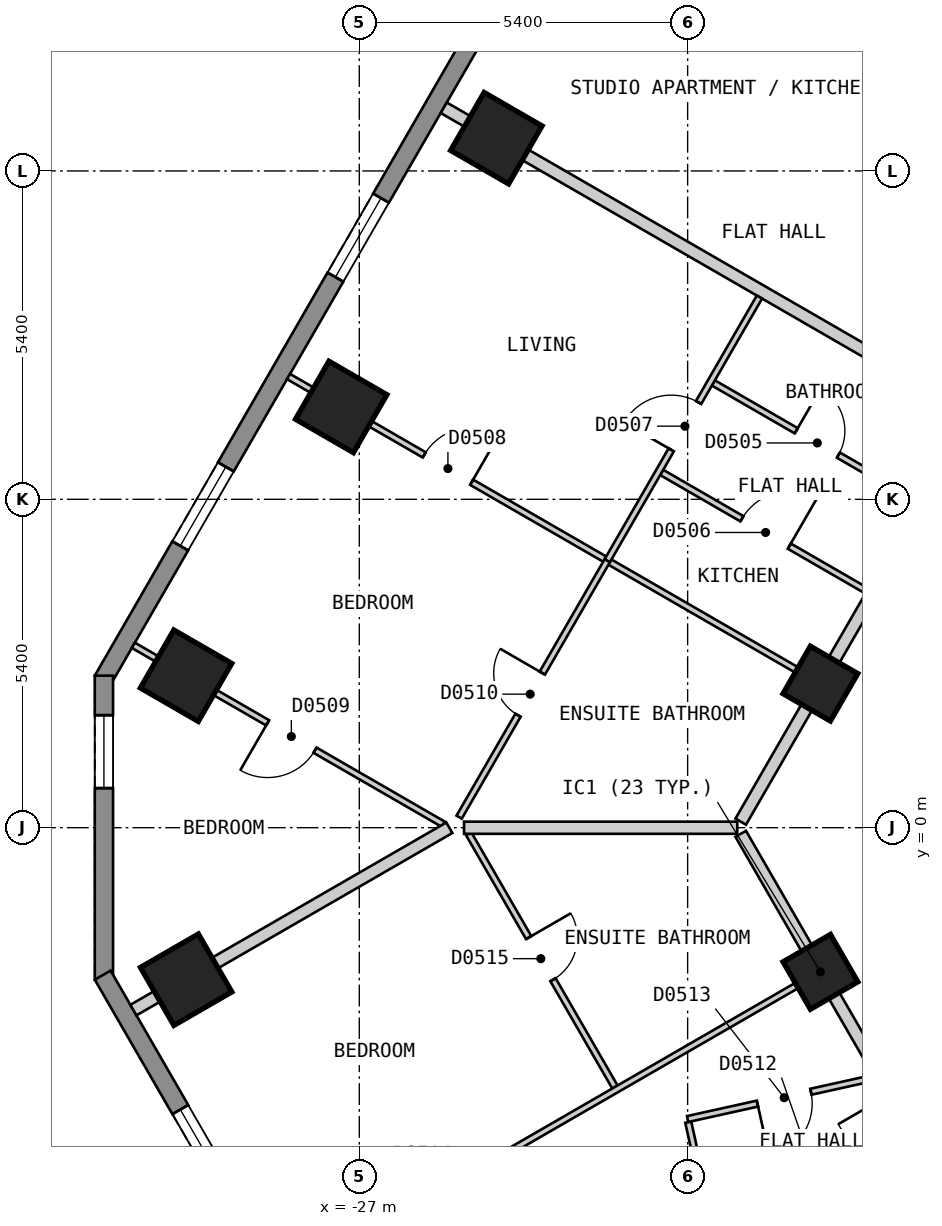
"""IFC4 building model, lengths in metres.
Left out: names, types, materials, properties, quantities, classifications, styles, units other than length and angle.
Written with IfcOpenShell. Run it as: python <this file> out.ifc"""

import sys

from ifc_helpers import new_model, si_unit, direction, frame, frame_2d, origin, origin_2d, place, context, subcontext, project, spatial, polyline, rectangle, outline, extrude, element, fill, save


model = new_model("IFC4")
c1 = context("Model", 3, precision=1e-05, world=origin(), true_north=direction((0.0, 1.0)))
c2 = subcontext(c1, "Body", "Model", "MODEL_VIEW")
j1 = project(units=[si_unit("LENGTHUNIT", "METRE"), si_unit("PLANEANGLEUNIT", "RADIAN")], contexts=[c1])
p1 = place(None, origin())
s1 = spatial("IfcSite", under=j1, at=p1, CompositionType="ELEMENT")
p2 = place(p1, origin())
s2 = spatial("IfcBuilding", under=s1, at=p2, CompositionType="ELEMENT")
p3 = place(p2, frame((0.0, 0.0, 56.4)))
s3 = spatial("IfcBuildingStorey", under=s2, at=p3, CompositionType="ELEMENT", Elevation=56.4)
for number, where, z_axis, x_axis in (
    (1, (-24.746, 11.339, 0.0), (0.0, 0.0, 1.0), (-0.5, -0.866, 0.0)),
    (2, (-27.298, 6.919, 0.0), (0.0, 0.0, 1.0), (-0.5, -0.866, 0.0)),
    (3, (-29.849, 2.499, 0.0), (0.0, 0.0, 1.0), (-0.5, -0.866, 0.0)),
    (4, (-29.848, -2.5, 0.0), (0.0, 0.0, 1.0), (0.5, -0.866, 0.0)),
):
    element("IfcColumn", number, at=place(p3, frame(where, z_axis=z_axis, x_axis=x_axis)), inside=s3, PredefinedType="COLUMN", context=c2, shape_type="SweptSolid", body=[
        extrude(rectangle(XDim=1.1, YDim=1.1, at=origin_2d()), origin(), (0.0, 0.0, 1.0), 3.0),
    ])
for number, where, z_axis, x_axis in (
    (5, (-19.416, -2.371, 0.0), (0.0, 0.0, 1.0), (0.5, -0.866, 0.0)),
    (6, (-19.417, 2.369, 0.0), (0.0, 0.0, 1.0), (-0.5, -0.866, 0.0)),
):
    element("IfcColumn", number, at=place(p3, frame(where, z_axis=z_axis, x_axis=x_axis)), inside=s3, PredefinedType="COLUMN", context=c2, shape_type="SweptSolid", body=[
        extrude(rectangle(XDim=0.9, YDim=0.9, at=origin_2d()), origin(), (0.0, 0.0, 1.0), 3.0),
    ])
p4 = place(p3, frame((-17.71, 25.825, 0.0), z_axis=(0.0, 0.0, 1.0), x_axis=(-0.500001938803, -0.866024284413, 0.0)))
e7 = element("IfcWall", 7, at=p4, inside=s3, PredefinedType="SOLIDWALL", context=c2, shape_type="SweptSolid", body=[
    extrude(outline(polyline([(0.0, -0.15), (27.02, -0.15), (26.94, 0.15), (0.08, 0.15), (0.0, -0.15)])), origin(), (0.0, 0.0, 1.0), 2.7),
])
p5 = place(p4, frame((2.553, 0.0, 0.15)))
e8 = element("IfcOpeningElement", 8, at=p5, cuts=e7, PredefinedType="OPENING", context=c2, shape_type="SweptSolid", body=[
    extrude(rectangle(XDim=1.5, YDim=2.1, at=frame_2d((0.75, 1.05))), frame((0.0, 0.16, 0.0), z_axis=(0.0, -1.0, 0.0), x_axis=(1.0, 0.0, 0.0)), (0.0, 0.0, 1.0), 0.32),
])
p6 = place(p4, frame((7.658, 0.0, 0.15)))
e9 = element("IfcOpeningElement", 9, at=p6, cuts=e7, PredefinedType="OPENING", context=c2, shape_type="SweptSolid", body=[
    extrude(rectangle(XDim=1.5, YDim=2.1, at=frame_2d((0.75, 1.05))), frame((0.0, 0.16, 0.0), z_axis=(0.0, -1.0, 0.0), x_axis=(1.0, 0.0, 0.0)), (0.0, 0.0, 1.0), 0.32),
])
p7 = place(p4, frame((12.761, 0.0, 0.15)))
e10 = element("IfcOpeningElement", 10, at=p7, cuts=e7, PredefinedType="OPENING", context=c2, shape_type="SweptSolid", body=[
    extrude(rectangle(XDim=1.5, YDim=2.1, at=frame_2d((0.75, 1.05))), frame((0.0, 0.16, 0.0), z_axis=(0.0, -1.0, 0.0), x_axis=(1.0, 0.0, 0.0)), (0.0, 0.0, 1.0), 0.32),
])
p8 = place(p4, frame((17.865, 0.0, 0.15)))
e11 = element("IfcOpeningElement", 11, at=p8, cuts=e7, PredefinedType="OPENING", context=c2, shape_type="SweptSolid", body=[
    extrude(rectangle(XDim=1.5, YDim=2.1, at=frame_2d((0.75, 1.05))), frame((0.0, 0.16, 0.0), z_axis=(0.0, -1.0, 0.0), x_axis=(1.0, 0.0, 0.0)), (0.0, 0.0, 1.0), 0.32),
])
p9 = place(p4, frame((22.969, 0.0, 0.15)))
e12 = element("IfcOpeningElement", 12, at=p9, cuts=e7, PredefinedType="OPENING", context=c2, shape_type="SweptSolid", body=[
    extrude(rectangle(XDim=1.5, YDim=2.1, at=frame_2d((0.75, 1.05))), frame((0.0, 0.16, 0.0), z_axis=(0.0, -1.0, 0.0), x_axis=(1.0, 0.0, 0.0)), (0.0, 0.0, 1.0), 0.32),
])
p10 = place(p3, frame((-31.2, 2.5, 0.0), z_axis=(0.0, 0.0, 1.0), x_axis=(0.0, -1.0, 0.0)))
e13 = element("IfcWall", 13, at=p10, inside=s3, PredefinedType="SOLIDWALL", context=c2, shape_type="SweptSolid", body=[
    extrude(outline(polyline([(0.0, -0.15), (5.0, -0.15), (4.92, 0.15), (0.08, 0.15), (0.0, -0.15)])), origin(), (0.0, 0.0, 1.0), 2.7),
])
p11 = place(p10, frame((0.65, 0.0, 0.15)))
e14 = element("IfcOpeningElement", 14, at=p11, cuts=e13, PredefinedType="OPENING", context=c2, shape_type="SweptSolid", body=[
    extrude(rectangle(XDim=1.2, YDim=2.1, at=frame_2d((0.6, 1.05))), frame((0.0, 0.16, 0.0), z_axis=(0.0, -1.0, 0.0), x_axis=(1.0, 0.0, 0.0)), (0.0, 0.0, 1.0), 0.32),
])
p12 = place(p3, frame((-31.22, -2.425, 0.0), z_axis=(0.0, 0.0, 1.0), x_axis=(0.500001938803, -0.866024284413, 0.0)))
e15 = element("IfcWall", 15, at=p12, inside=s3, PredefinedType="SOLIDWALL", context=c2, shape_type="SweptSolid", body=[
    extrude(outline(polyline([(0.0, -0.15), (27.02, -0.15), (26.94, 0.15), (0.08, 0.15), (0.0, -0.15)])), origin(), (0.0, 0.0, 1.0), 2.7),
])
p13 = place(p12, frame((2.553, 0.0, 0.15)))
e16 = element("IfcOpeningElement", 16, at=p13, cuts=e15, PredefinedType="OPENING", context=c2, shape_type="SweptSolid", body=[
    extrude(rectangle(XDim=1.5, YDim=2.1, at=frame_2d((0.75, 1.05))), frame((0.0, 0.16, 0.0), z_axis=(0.0, -1.0, 0.0), x_axis=(1.0, 0.0, 0.0)), (0.0, 0.0, 1.0), 0.32),
])
p14 = place(p12, frame((7.657, 0.0, 0.15)))
e17 = element("IfcOpeningElement", 17, at=p14, cuts=e15, PredefinedType="OPENING", context=c2, shape_type="SweptSolid", body=[
    extrude(rectangle(XDim=1.5, YDim=2.1, at=frame_2d((0.75, 1.05))), frame((0.0, 0.16, 0.0), z_axis=(0.0, -1.0, 0.0), x_axis=(1.0, 0.0, 0.0)), (0.0, 0.0, 1.0), 0.32),
])
p15 = place(p12, frame((12.761, 0.0, 0.15)))
e18 = element("IfcOpeningElement", 18, at=p15, cuts=e15, PredefinedType="OPENING", context=c2, shape_type="SweptSolid", body=[
    extrude(rectangle(XDim=1.5, YDim=2.1, at=frame_2d((0.75, 1.05))), frame((0.0, 0.16, 0.0), z_axis=(0.0, -1.0, 0.0), x_axis=(1.0, 0.0, 0.0)), (0.0, 0.0, 1.0), 0.32),
])
p16 = place(p12, frame((17.865, 0.0, 0.15)))
e19 = element("IfcOpeningElement", 19, at=p16, cuts=e15, PredefinedType="OPENING", context=c2, shape_type="SweptSolid", body=[
    extrude(rectangle(XDim=1.5, YDim=2.1, at=frame_2d((0.75, 1.05))), frame((0.0, 0.16, 0.0), z_axis=(0.0, -1.0, 0.0), x_axis=(1.0, 0.0, 0.0)), (0.0, 0.0, 1.0), 0.32),
])
p17 = place(p12, frame((22.969, 0.0, 0.15)))
e20 = element("IfcOpeningElement", 20, at=p17, cuts=e15, PredefinedType="OPENING", context=c2, shape_type="SweptSolid", body=[
    extrude(rectangle(XDim=1.5, YDim=2.1, at=frame_2d((0.75, 1.05))), frame((0.0, 0.16, 0.0), z_axis=(0.0, -1.0, 0.0), x_axis=(1.0, 0.0, 0.0)), (0.0, 0.0, 1.0), 0.32),
])
p18 = place(p3, frame((-20.727, -0.101, 0.0), z_axis=(0.0, 0.0, 1.0), x_axis=(0.500065652488, -0.865987495984, 0.0)))
e21 = element("IfcWall", 21, at=p18, inside=s3, PredefinedType="PARTITIONING", context=c2, shape_type="SweptSolid", body=[
    extrude(rectangle(XDim=7.389, YDim=0.2, at=frame_2d((3.695, 0.0))), origin(), (0.0, 0.0, 1.0), 2.7),
])
p19 = place(p18, frame((4.937, 0.0, 0.0)))
e22 = element("IfcOpeningElement", 22, at=p19, cuts=e21, PredefinedType="OPENING", context=c2, shape_type="SweptSolid", body=[
    extrude(rectangle(XDim=1.0, YDim=2.1, at=frame_2d((0.5, 1.05))), frame((0.0, 0.11, 0.0), z_axis=(0.0, -1.0, 0.0), x_axis=(1.0, 0.0, 0.0)), (0.0, 0.0, 1.0), 0.22),
])
p20 = place(p3, frame((-20.727, 0.099, 0.0), z_axis=(0.0, 0.0, 1.0), x_axis=(0.499993204491, 0.866029327138, 0.0)))
e23 = element("IfcWall", 23, at=p20, inside=s3, PredefinedType="PARTITIONING", context=c2, shape_type="SweptSolid", body=[
    extrude(rectangle(XDim=20.554, YDim=0.2, at=frame_2d((10.277, 0.0))), origin(), (0.0, 0.0, 1.0), 2.7),
])
p21 = place(p20, frame((9.776, 0.0, 0.0)))
e24 = element("IfcOpeningElement", 24, at=p21, cuts=e23, PredefinedType="OPENING", context=c2, shape_type="SweptSolid", body=[
    extrude(rectangle(XDim=1.0, YDim=2.1, at=frame_2d((0.5, 1.05))), frame((0.0, 0.11, 0.0), z_axis=(0.0, -1.0, 0.0), x_axis=(1.0, 0.0, 0.0)), (0.0, 0.0, 1.0), 0.22),
])
p22 = place(p20, frame((4.673, 0.0, 0.0)))
e25 = element("IfcOpeningElement", 25, at=p22, cuts=e23, PredefinedType="OPENING", context=c2, shape_type="SweptSolid", body=[
    extrude(rectangle(XDim=1.0, YDim=2.1, at=frame_2d((0.5, 1.05))), frame((0.0, 0.11, 0.0), z_axis=(0.0, -1.0, 0.0), x_axis=(1.0, 0.0, 0.0)), (0.0, 0.0, 1.0), 0.22),
])
p23 = place(p20, frame((14.88, 0.0, 0.0)))
e26 = element("IfcOpeningElement", 26, at=p23, cuts=e23, PredefinedType="OPENING", context=c2, shape_type="SweptSolid", body=[
    extrude(rectangle(XDim=1.0, YDim=2.1, at=frame_2d((0.5, 1.05))), frame((0.0, 0.11, 0.0), z_axis=(0.0, -1.0, 0.0), x_axis=(1.0, 0.0, 0.0)), (0.0, 0.0, 1.0), 0.22),
])
p24 = place(p3, frame((-25.2, -0.101, 0.0), z_axis=(0.0, 0.0, 1.0), x_axis=(0.500099052605, -0.865968208183, 0.0)))
e27 = element("IfcWall", 27, at=p24, inside=s3, PredefinedType="PARTITIONING", context=c2, shape_type="SweptSolid", body=[
    extrude(rectangle(XDim=4.807, YDim=0.1, at=frame_2d((2.404, 0.0))), origin(), (0.0, 0.0, 1.0), 2.7),
])
p25 = place(p24, frame((1.971, 0.0, 0.0)))
e28 = element("IfcOpeningElement", 28, at=p25, cuts=e27, PredefinedType="OPENING", context=c2, shape_type="SweptSolid", body=[
    extrude(rectangle(XDim=0.8, YDim=2.1, at=frame_2d((0.4, 1.05))), frame((0.0, 0.06, 0.0), z_axis=(0.0, -1.0, 0.0), x_axis=(1.0, 0.0, 0.0)), (0.0, 0.0, 1.0), 0.12),
])
p26 = place(p3, frame((-21.59, -4.842, 0.0), z_axis=(0.0, 0.0, 1.0), x_axis=(0.216524734289, -0.976277132499, 0.0)))
e29 = element("IfcWall", 29, at=p26, inside=s3, PredefinedType="PARTITIONING", context=c2, shape_type="SweptSolid", body=[
    extrude(rectangle(XDim=3.377, YDim=0.1, at=frame_2d((1.688, 0.0))), origin(), (0.0, 0.0, 1.0), 2.7),
])
p27 = place(p3, frame((-21.177, 7.314, 0.0), z_axis=(0.0, 0.0, 1.0), x_axis=(0.865979019114, -0.500080332001, 0.0)))
e30 = element("IfcWall", 30, at=p27, inside=s3, PredefinedType="PARTITIONING", context=c2, shape_type="SweptSolid", body=[
    extrude(rectangle(XDim=3.897, YDim=0.1, at=frame_2d((1.949, 0.0))), origin(), (0.0, 0.0, 1.0), 2.7),
])
p28 = place(p27, frame((1.574, 0.0, 0.0)))
e31 = element("IfcOpeningElement", 31, at=p28, cuts=e30, PredefinedType="OPENING", context=c2, shape_type="SweptSolid", body=[
    extrude(rectangle(XDim=0.8, YDim=2.1, at=frame_2d((0.4, 1.05))), frame((0.0, 0.06, 0.0), z_axis=(0.0, -1.0, 0.0), x_axis=(1.0, 0.0, 0.0)), (0.0, 0.0, 1.0), 0.12),
])
p29 = place(p3, frame((-22.027, 5.842, 0.0), z_axis=(0.0, 0.0, 1.0), x_axis=(0.865979019114, -0.500080332001, 0.0)))
e32 = element("IfcWall", 32, at=p29, inside=s3, PredefinedType="PARTITIONING", context=c2, shape_type="SweptSolid", body=[
    extrude(rectangle(XDim=3.897, YDim=0.1, at=frame_2d((1.949, 0.0))), origin(), (0.0, 0.0, 1.0), 2.7),
])
p30 = place(p29, frame((1.524, 0.0, 0.0)))
e33 = element("IfcOpeningElement", 33, at=p30, cuts=e32, PredefinedType="OPENING", context=c2, shape_type="SweptSolid", body=[
    extrude(rectangle(XDim=0.9, YDim=2.1, at=frame_2d((0.45, 1.05))), frame((0.0, 0.06, 0.0), z_axis=(0.0, -1.0, 0.0), x_axis=(1.0, 0.0, 0.0)), (0.0, 0.0, 1.0), 0.12),
])
p31 = place(p3, frame((-28.164, 7.419, 0.0), z_axis=(0.0, 0.0, 1.0), x_axis=(0.866047370643, -0.499961950354, 0.0)))
e34 = element("IfcWall", 34, at=p31, inside=s3, PredefinedType="PARTITIONING", context=c2, shape_type="SweptSolid", body=[
    extrude(rectangle(XDim=10.001, YDim=0.1, at=frame_2d((5.0, 0.0))), origin(), (0.0, 0.0, 1.0), 2.7),
])
p32 = place(p31, frame((2.577, 0.0, 0.0)))
e35 = element("IfcOpeningElement", 35, at=p32, cuts=e34, PredefinedType="OPENING", context=c2, shape_type="SweptSolid", body=[
    extrude(rectangle(XDim=0.9, YDim=2.1, at=frame_2d((0.45, 1.05))), frame((0.0, 0.06, 0.0), z_axis=(0.0, -1.0, 0.0), x_axis=(1.0, 0.0, 0.0)), (0.0, 0.0, 1.0), 0.12),
])
p33 = place(p3, frame((-30.716, 2.999, 0.0), z_axis=(0.0, 0.0, 1.0), x_axis=(0.866025981722, -0.499998998981, 0.0)))
e36 = element("IfcWall", 36, at=p33, inside=s3, PredefinedType="PARTITIONING", context=c2, shape_type="SweptSolid", body=[
    extrude(rectangle(XDim=5.884, YDim=0.1, at=frame_2d((2.942, 0.0))), origin(), (0.0, 0.0, 1.0), 2.7),
])
p34 = place(p33, frame((2.55, 0.0, 0.0)))
e37 = element("IfcOpeningElement", 37, at=p34, cuts=e36, PredefinedType="OPENING", context=c2, shape_type="SweptSolid", body=[
    extrude(rectangle(XDim=0.9, YDim=2.1, at=frame_2d((0.45, 1.05))), frame((0.0, 0.06, 0.0), z_axis=(0.0, -1.0, 0.0), x_axis=(1.0, 0.0, 0.0)), (0.0, 0.0, 1.0), 0.12),
])
p35 = place(p3, frame((-25.358, 0.173, 0.0), z_axis=(0.0, 0.0, 1.0), x_axis=(0.500180754623, 0.8659210199, 0.0)))
e38 = element("IfcWall", 38, at=p35, inside=s3, PredefinedType="PARTITIONING", context=c2, shape_type="SweptSolid", body=[
    extrude(rectangle(XDim=4.872, YDim=0.1, at=frame_2d((2.436, 0.0))), origin(), (0.0, 0.0, 1.0), 2.7),
])
p36 = place(p35, frame((1.936, 0.0, 0.0)))
e39 = element("IfcOpeningElement", 39, at=p36, cuts=e38, PredefinedType="OPENING", context=c2, shape_type="SweptSolid", body=[
    extrude(rectangle(XDim=0.8, YDim=2.1, at=frame_2d((0.4, 1.05))), frame((0.0, 0.06, 0.0), z_axis=(0.0, -1.0, 0.0), x_axis=(1.0, 0.0, 0.0)), (0.0, 0.0, 1.0), 0.12),
])
p37 = place(p3, frame((-21.6, -4.792, 0.0), z_axis=(0.0, 0.0, 1.0), x_axis=(0.976320106661, 0.216330879278, 0.0)))
e40 = element("IfcWall", 40, at=p37, inside=s3, PredefinedType="PARTITIONING", context=c2, shape_type="SweptSolid", body=[
    extrude(rectangle(XDim=3.147, YDim=0.1, at=frame_2d((1.574, 0.0))), origin(), (0.0, 0.0, 1.0), 2.7),
])
p38 = place(p37, frame((1.176, 0.0, 0.0)))
e41 = element("IfcOpeningElement", 41, at=p38, cuts=e40, PredefinedType="OPENING", context=c2, shape_type="SweptSolid", body=[
    extrude(rectangle(XDim=0.9, YDim=2.1, at=frame_2d((0.45, 1.05))), frame((0.0, 0.06, 0.0), z_axis=(0.0, -1.0, 0.0), x_axis=(1.0, 0.0, 0.0)), (0.0, 0.0, 1.0), 0.12),
])
p39 = place(p3, frame((-28.163, -7.42, 0.0), z_axis=(0.0, 0.0, 1.0), x_axis=(0.866065245018, 0.499930986609, 0.0)))
e42 = element("IfcWall", 42, at=p39, inside=s3, PredefinedType="PARTITIONING", context=c2, shape_type="SweptSolid", body=[
    extrude(rectangle(XDim=10.0, YDim=0.1, at=frame_2d((5.0, 0.0))), origin(), (0.0, 0.0, 1.0), 2.7),
])
p40 = place(p39, frame((2.663, 0.0, 0.0)))
e43 = element("IfcOpeningElement", 43, at=p40, cuts=e42, PredefinedType="OPENING", context=c2, shape_type="SweptSolid", body=[
    extrude(rectangle(XDim=0.9, YDim=2.1, at=frame_2d((0.45, 1.05))), frame((0.0, 0.06, 0.0), z_axis=(0.0, -1.0, 0.0), x_axis=(1.0, 0.0, 0.0)), (0.0, 0.0, 1.0), 0.12),
])
p41 = place(p3, frame((-25.611, 11.839, 0.0), z_axis=(0.0, 0.0, 1.0), x_axis=(0.866022959057, -0.500004234368, 0.0)))
e44 = element("IfcWall", 44, at=p41, inside=s3, PredefinedType="PARTITIONING", context=c2, shape_type="SweptSolid", body=[
    extrude(rectangle(XDim=10.0, YDim=0.2, at=frame_2d((5.0, 0.0))), origin(), (0.0, 0.0, 1.0), 2.7),
])
p42 = place(p3, frame((-23.06, 16.259, 0.0), z_axis=(0.0, 0.0, 1.0), x_axis=(0.866047370643, -0.499961950354, 0.0)))
e45 = element("IfcWall", 45, at=p42, inside=s3, PredefinedType="PARTITIONING", context=c2, shape_type="SweptSolid", body=[
    extrude(rectangle(XDim=10.001, YDim=0.2, at=frame_2d((5.0, 0.0))), origin(), (0.0, 0.0, 1.0), 2.7),
])
p43 = place(p3, frame((-25.277, -0.001, 0.0), z_axis=(0.0, 0.0, 1.0), x_axis=(1.0, 0.0, 0.0)))
e46 = element("IfcWall", 46, at=p43, inside=s3, PredefinedType="PARTITIONING", context=c2, shape_type="SweptSolid", body=[
    extrude(rectangle(XDim=4.493, YDim=0.2, at=frame_2d((2.247, 0.0))), origin(), (0.0, 0.0, 1.0), 2.7),
])
p44 = place(p3, frame((-30.715, -3.0, 0.0), z_axis=(0.0, 0.0, 1.0), x_axis=(0.86609140076, 0.499885672459, 0.0)))
e47 = element("IfcWall", 47, at=p44, inside=s3, PredefinedType="PARTITIONING", context=c2, shape_type="SweptSolid", body=[
    extrude(rectangle(XDim=6.0, YDim=0.2, at=frame_2d((3.0, 0.0))), origin(), (0.0, 0.0, 1.0), 2.7),
])
p45 = place(p3, frame((-22.921, 4.392, 0.0), z_axis=(0.0, 0.0, 1.0), x_axis=(0.499958946799, 0.866049104564, 0.0)))
e48 = element("IfcWall", 48, at=p45, inside=s3, PredefinedType="PARTITIONING", context=c2, shape_type="SweptSolid", body=[
    extrude(rectangle(XDim=5.004, YDim=0.1, at=frame_2d((2.502, 0.0))), origin(), (0.0, 0.0, 1.0), 2.7),
])
p46 = place(p45, frame((2.103, 0.0, 0.0)))
e49 = element("IfcOpeningElement", 49, at=p46, cuts=e48, PredefinedType="OPENING", context=c2, shape_type="SweptSolid", body=[
    extrude(rectangle(XDim=0.9, YDim=2.1, at=frame_2d((0.45, 1.05))), frame((0.0, 0.06, 0.0), z_axis=(0.0, -1.0, 0.0), x_axis=(1.0, 0.0, 0.0)), (0.0, 0.0, 1.0), 0.12),
])
p47 = place(p8, origin())
e50 = element("IfcWindow", 50, at=p47, inside=s3, PartitioningType="SINGLE_PANEL", PredefinedType="WINDOW", context=c2, shape_type="SweptSolid", body=[
    extrude(rectangle(XDim=1.5, YDim=2.1, at=frame_2d((0.75, 1.05))), frame((0.0, 0.03, 0.0), z_axis=(0.0, -1.0, 0.0), x_axis=(1.0, 0.0, 0.0)), (0.0, 0.0, 1.0), 0.06),
])
fill(e11, e50)
p48 = place(p9, origin())
e51 = element("IfcWindow", 51, at=p48, inside=s3, PartitioningType="SINGLE_PANEL", PredefinedType="WINDOW", context=c2, shape_type="SweptSolid", body=[
    extrude(rectangle(XDim=1.5, YDim=2.1, at=frame_2d((0.75, 1.05))), frame((0.0, 0.03, 0.0), z_axis=(0.0, -1.0, 0.0), x_axis=(1.0, 0.0, 0.0)), (0.0, 0.0, 1.0), 0.06),
])
fill(e12, e51)
p49 = place(p11, origin())
e52 = element("IfcWindow", 52, at=p49, inside=s3, PartitioningType="SINGLE_PANEL", PredefinedType="WINDOW", context=c2, shape_type="SweptSolid", body=[
    extrude(rectangle(XDim=1.2, YDim=2.1, at=frame_2d((0.6, 1.05))), frame((0.0, 0.03, 0.0), z_axis=(0.0, -1.0, 0.0), x_axis=(1.0, 0.0, 0.0)), (0.0, 0.0, 1.0), 0.06),
])
fill(e14, e52)
p50 = place(p13, origin())
e53 = element("IfcWindow", 53, at=p50, inside=s3, PartitioningType="SINGLE_PANEL", PredefinedType="WINDOW", context=c2, shape_type="SweptSolid", body=[
    extrude(rectangle(XDim=1.5, YDim=2.1, at=frame_2d((0.75, 1.05))), frame((0.0, 0.03, 0.0), z_axis=(0.0, -1.0, 0.0), x_axis=(1.0, 0.0, 0.0)), (0.0, 0.0, 1.0), 0.06),
])
fill(e16, e53)
p51 = place(p28, origin())
e54 = element("IfcDoor", 54, at=p51, inside=s3, OperationType="SINGLE_SWING_LEFT", PredefinedType="DOOR", context=c2, shape_type="SweptSolid", body=[
    extrude(rectangle(XDim=0.8, YDim=2.1, at=frame_2d((0.4, 1.05))), frame((0.0, 0.025, 0.0), z_axis=(0.0, -1.0, 0.0), x_axis=(1.0, 0.0, 0.0)), (0.0, 0.0, 1.0), 0.05),
])
fill(e31, e54)
p52 = place(p30, origin())
e55 = element("IfcDoor", 55, at=p52, inside=s3, OperationType="SINGLE_SWING_RIGHT", PredefinedType="DOOR", context=c2, shape_type="SweptSolid", body=[
    extrude(rectangle(XDim=0.9, YDim=2.1, at=frame_2d((0.45, 1.05))), frame((0.0, 0.025, 0.0), z_axis=(0.0, -1.0, 0.0), x_axis=(1.0, 0.0, 0.0)), (0.0, 0.0, 1.0), 0.05),
])
fill(e33, e55)
p53 = place(p46, origin())
e56 = element("IfcDoor", 56, at=p53, inside=s3, OperationType="SINGLE_SWING_LEFT", PredefinedType="DOOR", context=c2, shape_type="SweptSolid", body=[
    extrude(rectangle(XDim=0.9, YDim=2.1, at=frame_2d((0.45, 1.05))), frame((0.0, 0.025, 0.0), z_axis=(0.0, -1.0, 0.0), x_axis=(1.0, 0.0, 0.0)), (0.0, 0.0, 1.0), 0.05),
])
fill(e49, e56)
p54 = place(p32, origin())
e57 = element("IfcDoor", 57, at=p54, inside=s3, OperationType="SINGLE_SWING_RIGHT", PredefinedType="DOOR", context=c2, shape_type="SweptSolid", body=[
    extrude(rectangle(XDim=0.9, YDim=2.1, at=frame_2d((0.45, 1.05))), frame((0.0, 0.025, 0.0), z_axis=(0.0, -1.0, 0.0), x_axis=(1.0, 0.0, 0.0)), (0.0, 0.0, 1.0), 0.05),
])
fill(e35, e57)
p55 = place(p34, origin())
e58 = element("IfcDoor", 58, at=p55, inside=s3, OperationType="SINGLE_SWING_LEFT", PredefinedType="DOOR", context=c2, shape_type="SweptSolid", body=[
    extrude(rectangle(XDim=0.9, YDim=2.1, at=frame_2d((0.45, 1.05))), frame((0.0, 0.025, 0.0), z_axis=(0.0, -1.0, 0.0), x_axis=(1.0, 0.0, 0.0)), (0.0, 0.0, 1.0), 0.05),
])
fill(e37, e58)
p56 = place(p36, origin())
e59 = element("IfcDoor", 59, at=p56, inside=s3, OperationType="SINGLE_SWING_RIGHT", PredefinedType="DOOR", context=c2, shape_type="SweptSolid", body=[
    extrude(rectangle(XDim=0.8, YDim=2.1, at=frame_2d((0.4, 1.05))), frame((0.0, 0.025, 0.0), z_axis=(0.0, -1.0, 0.0), x_axis=(1.0, 0.0, 0.0)), (0.0, 0.0, 1.0), 0.05),
])
fill(e39, e59)
p57 = place(p38, origin())
e60 = element("IfcDoor", 60, at=p57, inside=s3, OperationType="SINGLE_SWING_LEFT", PredefinedType="DOOR", context=c2, shape_type="SweptSolid", body=[
    extrude(rectangle(XDim=0.9, YDim=2.1, at=frame_2d((0.45, 1.05))), frame((0.0, 0.025, 0.0), z_axis=(0.0, -1.0, 0.0), x_axis=(1.0, 0.0, 0.0)), (0.0, 0.0, 1.0), 0.05),
])
fill(e41, e60)
p58 = place(p25, origin())
e61 = element("IfcDoor", 61, at=p58, inside=s3, OperationType="SINGLE_SWING_LEFT", PredefinedType="DOOR", context=c2, shape_type="SweptSolid", body=[
    extrude(rectangle(XDim=0.8, YDim=2.1, at=frame_2d((0.4, 1.05))), frame((0.0, 0.025, 0.0), z_axis=(0.0, -1.0, 0.0), x_axis=(1.0, 0.0, 0.0)), (0.0, 0.0, 1.0), 0.05),
])
fill(e28, e61)
save(model, sys.argv[1])
